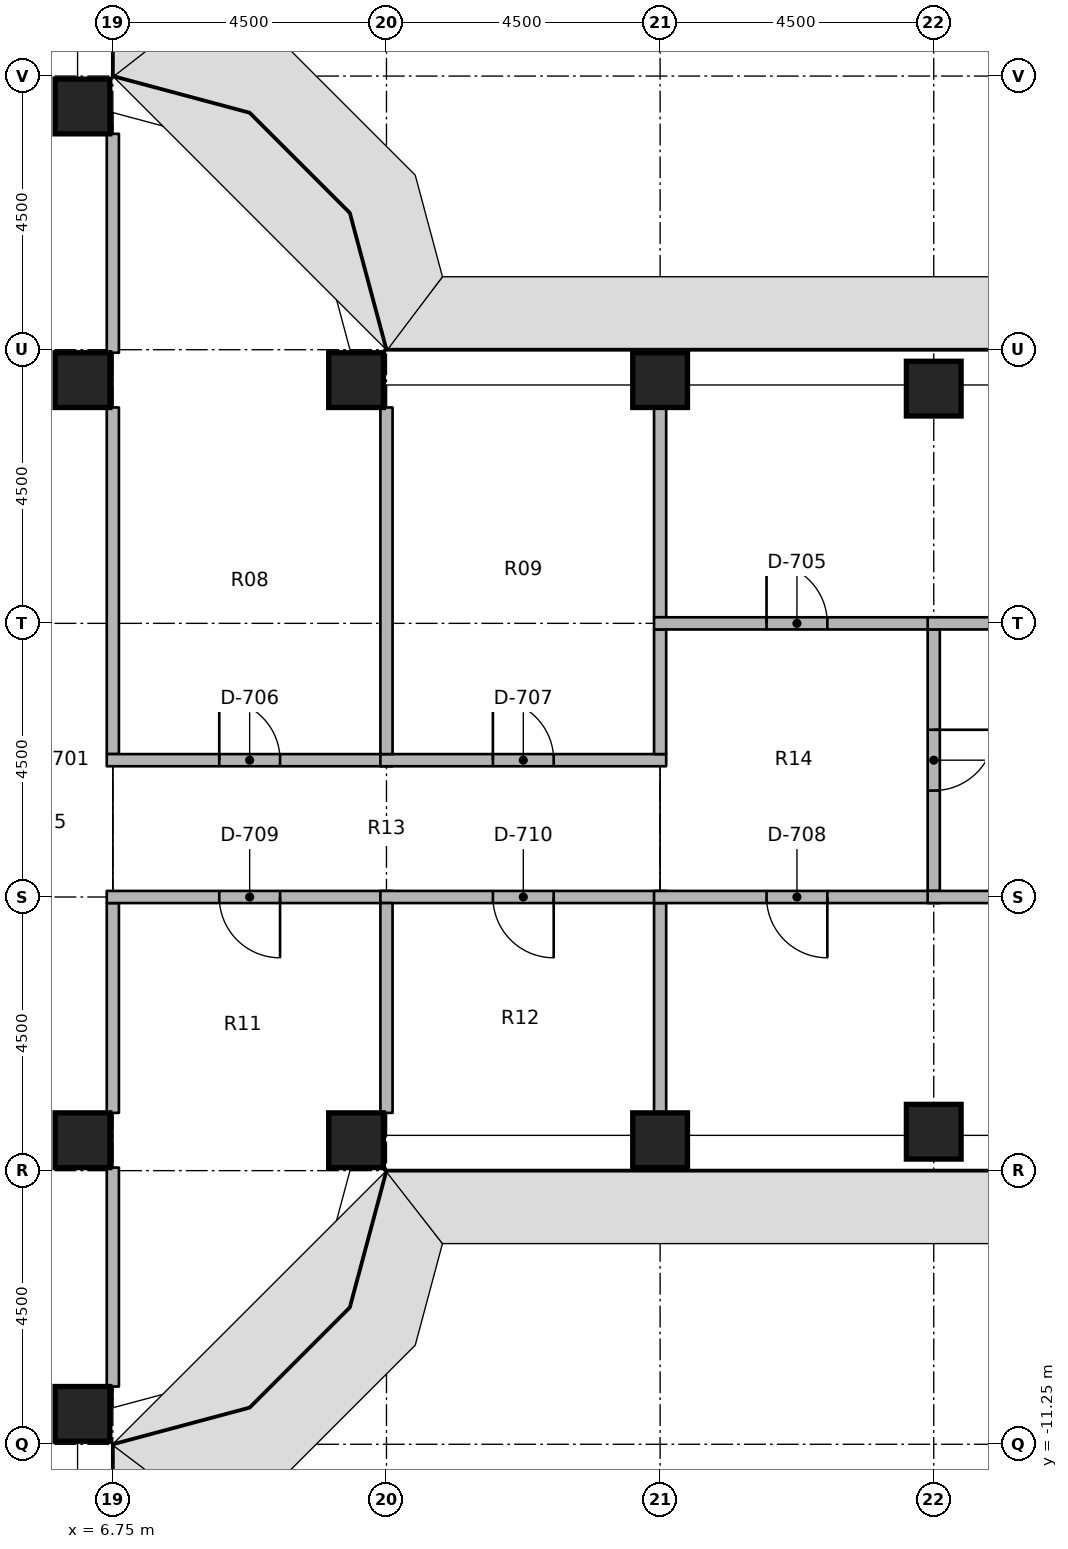
"""IFC4 building model, lengths in metres.
Left out: names, types, materials, properties, quantities, classifications, styles, units other than length and angle.
Written with IfcOpenShell. Run it as: python <this file> out.ifc"""

import sys

from ifc_helpers import new_model, si_unit, direction, frame, frame_2d, origin, origin_2d, place, context, subcontext, project, spatial, rectangle, extrude, element, fill, save


model = new_model("IFC4")
c1 = context("Model", 3, precision=1e-05, world=origin(), true_north=direction((0.0, 1.0)))
c2 = subcontext(c1, "Body", "Model", "MODEL_VIEW")
j1 = project(units=[si_unit("LENGTHUNIT", "METRE"), si_unit("PLANEANGLEUNIT", "RADIAN")], contexts=[c1])
p1 = place(None, origin())
s1 = spatial("IfcSite", under=j1, at=p1, CompositionType="ELEMENT")
p2 = place(p1, origin())
s2 = spatial("IfcBuilding", under=s1, at=p2, CompositionType="ELEMENT")
p3 = place(p2, frame((0.0, 0.0, 94.2)))
s3 = spatial("IfcBuildingStorey", under=s2, at=p3, CompositionType="ELEMENT", Elevation=94.2)
for number, where, z_axis, x_axis in (
    (1, (6.25, -10.75, 0.0), (0.0, 0.0, 1.0), (1.0, 0.0, 0.0)),
    (2, (6.25, -6.25, 0.0), (0.0, 0.0, 1.0), (1.0, 0.0, 0.0)),
    (3, (6.25, 6.25, 0.0), (0.0, 0.0, 1.0), (1.0, 0.0, 0.0)),
    (4, (6.25, 10.75, 0.0), (0.0, 0.0, 1.0), (1.0, 0.0, 0.0)),
    (5, (10.75, -6.25, 0.0), (0.0, 0.0, 1.0), (1.0, 0.0, 0.0)),
    (6, (10.75, 6.25, 0.0), (0.0, 0.0, 1.0), (1.0, 0.0, 0.0)),
    (7, (15.75, -6.25, 0.0), (0.0, 0.0, 1.0), (1.0, 0.0, 0.0)),
    (8, (15.75, 6.25, 0.0), (0.0, 0.0, 1.0), (1.0, 0.0, 0.0)),
    (9, (20.25, -6.11, 0.0), (0.0, 0.0, 1.0), (1.0, 0.0, 0.0)),
    (10, (20.25, 6.11, 0.0), (0.0, 0.0, 1.0), (1.0, 0.0, 0.0)),
):
    element("IfcColumn", number, at=place(p3, frame(where, z_axis=z_axis, x_axis=x_axis)), inside=s3, PredefinedType="COLUMN", context=c2, shape_type="SweptSolid", body=[
        extrude(rectangle(XDim=0.9, YDim=0.9, at=origin_2d()), origin(), (0.0, 0.0, 1.0), 3.65),
    ])
p4 = place(p3, frame((6.75, 0.1, 0.0), z_axis=(0.0, 0.0, 1.0), x_axis=(0.0, 1.0, 0.0)))
e11 = element("IfcWall", 11, at=p4, inside=s3, PredefinedType="PARTITIONING", context=c2, shape_type="SweptSolid", body=[
    extrude(rectangle(XDim=5.7, YDim=0.2, at=frame_2d((2.85, 0.0))), origin(), (0.0, 0.0, 1.0), 2.738),
])
for number, where, z_axis, x_axis in (
    (12, (6.75, 6.7, 0.0), (0.0, 0.0, 1.0), (0.0, 1.0, 0.0)),
    (13, (6.75, -10.3, 0.0), (0.0, 0.0, 1.0), (0.0, 1.0, 0.0)),
):
    element("IfcWall", number, at=place(p3, frame(where, z_axis=z_axis, x_axis=x_axis)), inside=s3, PredefinedType="PARTITIONING", context=c2, shape_type="SweptSolid", body=[
        extrude(rectangle(XDim=3.6, YDim=0.2, at=frame_2d((1.8, 0.0))), origin(), (0.0, 0.0, 1.0), 2.738),
    ])
p5 = place(p3, frame((6.75, -5.8, 0.0), z_axis=(0.0, 0.0, 1.0), x_axis=(0.0, 1.0, 0.0)))
e14 = element("IfcWall", 14, at=p5, inside=s3, PredefinedType="PARTITIONING", context=c2, shape_type="SweptSolid", body=[
    extrude(rectangle(XDim=3.45, YDim=0.2, at=frame_2d((1.725, 0.0))), origin(), (0.0, 0.0, 1.0), 2.738),
])
p6 = place(p3, frame((6.65, 0.0, 0.0), z_axis=(0.0, 0.0, 1.0), x_axis=(1.0, 0.0, 0.0)))
e15 = element("IfcWall", 15, at=p6, inside=s3, PredefinedType="PARTITIONING", context=c2, shape_type="SweptSolid", body=[
    extrude(rectangle(XDim=4.7, YDim=0.2, at=frame_2d((2.35, 0.0))), origin(), (0.0, 0.0, 1.0), 2.738),
])
p7 = place(p6, frame((1.85, 0.0, 0.0)))
e16 = element("IfcOpeningElement", 16, at=p7, cuts=e15, PredefinedType="OPENING", context=c2, shape_type="SweptSolid", body=[
    extrude(rectangle(XDim=1.0, YDim=2.1, at=frame_2d((0.5, 1.05))), frame((0.0, 0.11, 0.0), z_axis=(0.0, -1.0, 0.0), x_axis=(1.0, 0.0, 0.0)), (0.0, 0.0, 1.0), 0.22),
])
p8 = place(p3, frame((11.35, -2.25, 0.0), z_axis=(0.0, 0.0, 1.0), x_axis=(-1.0, 0.0, 0.0)))
e17 = element("IfcWall", 17, at=p8, inside=s3, PredefinedType="PARTITIONING", context=c2, shape_type="SweptSolid", body=[
    extrude(rectangle(XDim=4.7, YDim=0.2, at=frame_2d((2.35, 0.0))), origin(), (0.0, 0.0, 1.0), 2.738),
])
p9 = place(p8, frame((1.85, 0.0, 0.0)))
e18 = element("IfcOpeningElement", 18, at=p9, cuts=e17, PredefinedType="OPENING", context=c2, shape_type="SweptSolid", body=[
    extrude(rectangle(XDim=1.0, YDim=2.1, at=frame_2d((0.5, 1.05))), frame((0.0, 0.11, 0.0), z_axis=(0.0, -1.0, 0.0), x_axis=(1.0, 0.0, 0.0)), (0.0, 0.0, 1.0), 0.22),
])
p10 = place(p3, frame((11.15, 0.0, 0.0), z_axis=(0.0, 0.0, 1.0), x_axis=(1.0, 0.0, 0.0)))
e19 = element("IfcWall", 19, at=p10, inside=s3, PredefinedType="PARTITIONING", context=c2, shape_type="SweptSolid", body=[
    extrude(rectangle(XDim=4.7, YDim=0.2, at=frame_2d((2.35, 0.0))), origin(), (0.0, 0.0, 1.0), 2.738),
])
p11 = place(p10, frame((1.85, 0.0, 0.0)))
e20 = element("IfcOpeningElement", 20, at=p11, cuts=e19, PredefinedType="OPENING", context=c2, shape_type="SweptSolid", body=[
    extrude(rectangle(XDim=1.0, YDim=2.1, at=frame_2d((0.5, 1.05))), frame((0.0, 0.11, 0.0), z_axis=(0.0, -1.0, 0.0), x_axis=(1.0, 0.0, 0.0)), (0.0, 0.0, 1.0), 0.22),
])
p12 = place(p3, frame((15.85, -2.25, 0.0), z_axis=(0.0, 0.0, 1.0), x_axis=(-1.0, 0.0, 0.0)))
e21 = element("IfcWall", 21, at=p12, inside=s3, PredefinedType="PARTITIONING", context=c2, shape_type="SweptSolid", body=[
    extrude(rectangle(XDim=4.7, YDim=0.2, at=frame_2d((2.35, 0.0))), origin(), (0.0, 0.0, 1.0), 2.738),
])
p13 = place(p12, frame((1.85, 0.0, 0.0)))
e22 = element("IfcOpeningElement", 22, at=p13, cuts=e21, PredefinedType="OPENING", context=c2, shape_type="SweptSolid", body=[
    extrude(rectangle(XDim=1.0, YDim=2.1, at=frame_2d((0.5, 1.05))), frame((0.0, 0.11, 0.0), z_axis=(0.0, -1.0, 0.0), x_axis=(1.0, 0.0, 0.0)), (0.0, 0.0, 1.0), 0.22),
])
p14 = place(p3, frame((11.25, 0.1, 0.0), z_axis=(0.0, 0.0, 1.0), x_axis=(0.0, 1.0, 0.0)))
e23 = element("IfcWall", 23, at=p14, inside=s3, PredefinedType="PARTITIONING", context=c2, shape_type="SweptSolid", body=[
    extrude(rectangle(XDim=5.7, YDim=0.2, at=frame_2d((2.85, 0.0))), origin(), (0.0, 0.0, 1.0), 2.738),
])
p15 = place(p3, frame((11.25, -5.8, 0.0), z_axis=(0.0, 0.0, 1.0), x_axis=(0.0, 1.0, 0.0)))
e24 = element("IfcWall", 24, at=p15, inside=s3, PredefinedType="PARTITIONING", context=c2, shape_type="SweptSolid", body=[
    extrude(rectangle(XDim=3.45, YDim=0.2, at=frame_2d((1.725, 0.0))), origin(), (0.0, 0.0, 1.0), 2.738),
])
p16 = place(p3, frame((15.75, 0.1, 0.0), z_axis=(0.0, 0.0, 1.0), x_axis=(0.0, 1.0, 0.0)))
e25 = element("IfcWall", 25, at=p16, inside=s3, PredefinedType="PARTITIONING", context=c2, shape_type="SweptSolid", body=[
    extrude(rectangle(XDim=2.05, YDim=0.2, at=frame_2d((1.025, 0.0))), origin(), (0.0, 0.0, 1.0), 2.738),
])
for number, where, z_axis, x_axis in (
    (26, (15.75, 2.35, 0.0), (0.0, 0.0, 1.0), (0.0, 1.0, 0.0)),
    (27, (15.75, -5.8, 0.0), (0.0, 0.0, 1.0), (0.0, 1.0, 0.0)),
):
    element("IfcWall", number, at=place(p3, frame(where, z_axis=z_axis, x_axis=x_axis)), inside=s3, PredefinedType="PARTITIONING", context=c2, shape_type="SweptSolid", body=[
        extrude(rectangle(XDim=3.45, YDim=0.2, at=frame_2d((1.725, 0.0))), origin(), (0.0, 0.0, 1.0), 2.738),
    ])
p17 = place(p3, frame((15.65, 2.25, 0.0), z_axis=(0.0, 0.0, 1.0), x_axis=(1.0, 0.0, 0.0)))
e28 = element("IfcWall", 28, at=p17, inside=s3, PredefinedType="PARTITIONING", context=c2, shape_type="SweptSolid", body=[
    extrude(rectangle(XDim=4.7, YDim=0.2, at=frame_2d((2.35, 0.0))), origin(), (0.0, 0.0, 1.0), 2.738),
])
p18 = place(p17, frame((1.85, 0.0, 0.0)))
e29 = element("IfcOpeningElement", 29, at=p18, cuts=e28, PredefinedType="OPENING", context=c2, shape_type="SweptSolid", body=[
    extrude(rectangle(XDim=1.0, YDim=2.1, at=frame_2d((0.5, 1.05))), frame((0.0, 0.11, 0.0), z_axis=(0.0, -1.0, 0.0), x_axis=(1.0, 0.0, 0.0)), (0.0, 0.0, 1.0), 0.22),
])
p19 = place(p3, frame((20.35, -2.25, 0.0), z_axis=(0.0, 0.0, 1.0), x_axis=(-1.0, 0.0, 0.0)))
e30 = element("IfcWall", 30, at=p19, inside=s3, PredefinedType="PARTITIONING", context=c2, shape_type="SweptSolid", body=[
    extrude(rectangle(XDim=4.7, YDim=0.2, at=frame_2d((2.35, 0.0))), origin(), (0.0, 0.0, 1.0), 2.738),
])
p20 = place(p19, frame((1.85, 0.0, 0.0)))
e31 = element("IfcOpeningElement", 31, at=p20, cuts=e30, PredefinedType="OPENING", context=c2, shape_type="SweptSolid", body=[
    extrude(rectangle(XDim=1.0, YDim=2.1, at=frame_2d((0.5, 1.05))), frame((0.0, 0.11, 0.0), z_axis=(0.0, -1.0, 0.0), x_axis=(1.0, 0.0, 0.0)), (0.0, 0.0, 1.0), 0.22),
])
p21 = place(p3, frame((20.25, 2.15, 0.0), z_axis=(0.0, 0.0, 1.0), x_axis=(0.0, -1.0, 0.0)))
e32 = element("IfcWall", 32, at=p21, inside=s3, PredefinedType="PARTITIONING", context=c2, shape_type="SweptSolid", body=[
    extrude(rectangle(XDim=4.3, YDim=0.2, at=frame_2d((2.15, 0.0))), origin(), (0.0, 0.0, 1.0), 2.738),
])
p22 = place(p21, frame((1.65, 0.0, 0.0)))
e33 = element("IfcOpeningElement", 33, at=p22, cuts=e32, PredefinedType="OPENING", context=c2, shape_type="SweptSolid", body=[
    extrude(rectangle(XDim=1.0, YDim=2.1, at=frame_2d((0.5, 1.05))), frame((0.0, 0.11, 0.0), z_axis=(0.0, -1.0, 0.0), x_axis=(1.0, 0.0, 0.0)), (0.0, 0.0, 1.0), 0.22),
])
for number, where, z_axis, x_axis in (
    (34, (20.15, 2.25, 0.0), (0.0, 0.0, 1.0), (1.0, 0.0, 0.0)),
    (35, (20.15, -2.25, 0.0), (0.0, 0.0, 1.0), (1.0, 0.0, 0.0)),
):
    element("IfcWall", number, at=place(p3, frame(where, z_axis=z_axis, x_axis=x_axis)), inside=s3, PredefinedType="PARTITIONING", context=c2, shape_type="SweptSolid", body=[
        extrude(rectangle(XDim=8.07, YDim=0.2, at=frame_2d((4.035, 0.0))), origin(), (0.0, 0.0, 1.0), 2.738),
    ])
p23 = place(p22, origin())
e36 = element("IfcDoor", 36, at=p23, inside=s3, OperationType="SINGLE_SWING_RIGHT", PredefinedType="DOOR", context=c2, shape_type="SweptSolid", body=[
    extrude(rectangle(XDim=1.0, YDim=2.1, at=frame_2d((0.5, 1.05))), frame((0.0, 0.025, 0.0), z_axis=(0.0, -1.0, 0.0), x_axis=(1.0, 0.0, 0.0)), (0.0, 0.0, 1.0), 0.05),
])
fill(e33, e36)
p24 = place(p18, origin())
e37 = element("IfcDoor", 37, at=p24, inside=s3, OperationType="SINGLE_SWING_LEFT", PredefinedType="DOOR", context=c2, shape_type="SweptSolid", body=[
    extrude(rectangle(XDim=1.0, YDim=2.1, at=frame_2d((0.5, 1.05))), frame((0.0, 0.025, 0.0), z_axis=(0.0, -1.0, 0.0), x_axis=(1.0, 0.0, 0.0)), (0.0, 0.0, 1.0), 0.05),
])
fill(e29, e37)
p25 = place(p7, origin())
e38 = element("IfcDoor", 38, at=p25, inside=s3, OperationType="SINGLE_SWING_RIGHT", PredefinedType="DOOR", context=c2, shape_type="SweptSolid", body=[
    extrude(rectangle(XDim=1.0, YDim=2.1, at=frame_2d((0.5, 1.05))), frame((0.0, 0.025, 0.0), z_axis=(0.0, -1.0, 0.0), x_axis=(1.0, 0.0, 0.0)), (0.0, 0.0, 1.0), 0.05),
])
fill(e16, e38)
p26 = place(p11, origin())
e39 = element("IfcDoor", 39, at=p26, inside=s3, OperationType="SINGLE_SWING_RIGHT", PredefinedType="DOOR", context=c2, shape_type="SweptSolid", body=[
    extrude(rectangle(XDim=1.0, YDim=2.1, at=frame_2d((0.5, 1.05))), frame((0.0, 0.025, 0.0), z_axis=(0.0, -1.0, 0.0), x_axis=(1.0, 0.0, 0.0)), (0.0, 0.0, 1.0), 0.05),
])
fill(e20, e39)
p27 = place(p20, origin())
e40 = element("IfcDoor", 40, at=p27, inside=s3, OperationType="SINGLE_SWING_RIGHT", PredefinedType="DOOR", context=c2, shape_type="SweptSolid", body=[
    extrude(rectangle(XDim=1.0, YDim=2.1, at=frame_2d((0.5, 1.05))), frame((0.0, 0.025, 0.0), z_axis=(0.0, -1.0, 0.0), x_axis=(1.0, 0.0, 0.0)), (0.0, 0.0, 1.0), 0.05),
])
fill(e31, e40)
p28 = place(p9, origin())
e41 = element("IfcDoor", 41, at=p28, inside=s3, OperationType="SINGLE_SWING_RIGHT", PredefinedType="DOOR", context=c2, shape_type="SweptSolid", body=[
    extrude(rectangle(XDim=1.0, YDim=2.1, at=frame_2d((0.5, 1.05))), frame((0.0, 0.025, 0.0), z_axis=(0.0, -1.0, 0.0), x_axis=(1.0, 0.0, 0.0)), (0.0, 0.0, 1.0), 0.05),
])
fill(e18, e41)
p29 = place(p13, origin())
e42 = element("IfcDoor", 42, at=p29, inside=s3, OperationType="SINGLE_SWING_RIGHT", PredefinedType="DOOR", context=c2, shape_type="SweptSolid", body=[
    extrude(rectangle(XDim=1.0, YDim=2.1, at=frame_2d((0.5, 1.05))), frame((0.0, 0.025, 0.0), z_axis=(0.0, -1.0, 0.0), x_axis=(1.0, 0.0, 0.0)), (0.0, 0.0, 1.0), 0.05),
])
fill(e22, e42)
save(model, sys.argv[1])
